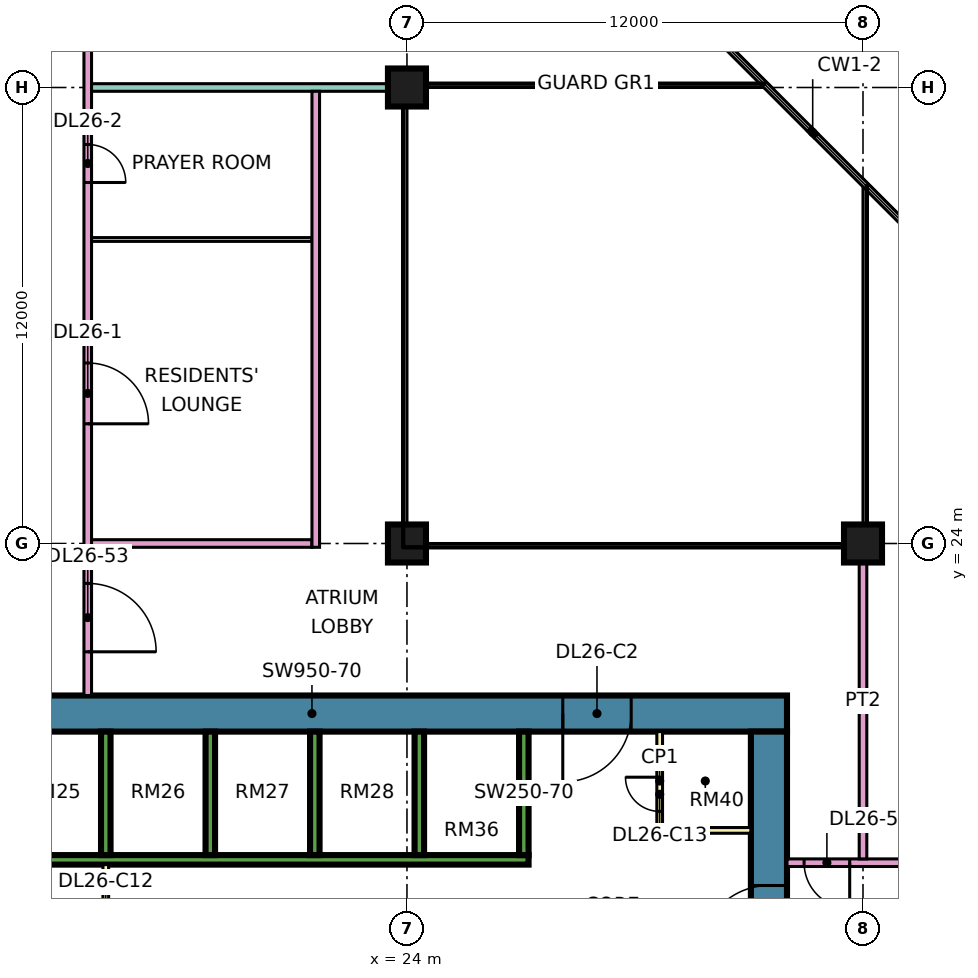
"""IFC4 building model, lengths in metres.
Left out: names, types, materials, properties, quantities, classifications, styles, units other than length and angle.
Written with IfcOpenShell. Run it as: python <this file> out.ifc"""

import sys

from ifc_helpers import new_model, si_unit, direction, frame, frame_2d, origin, origin_2d, place, context, subcontext, project, spatial, rectangle, extrude, element, fill, save


model = new_model("IFC4")
c1 = context("Model", 3, precision=1e-05, world=origin(), true_north=direction((0.0, 1.0)))
c2 = subcontext(c1, "Body", "Model", "MODEL_VIEW")
j1 = project(units=[si_unit("LENGTHUNIT", "METRE"), si_unit("PLANEANGLEUNIT", "RADIAN")], contexts=[c1])
p1 = place(None, origin())
s1 = spatial("IfcSite", under=j1, at=p1, CompositionType="ELEMENT")
p2 = place(p1, origin())
s2 = spatial("IfcBuilding", under=s1, at=p2, CompositionType="ELEMENT")
p3 = place(p2, frame((0.0, 0.0, 114.4)))
s3 = spatial("IfcBuildingStorey", under=s2, at=p3, CompositionType="ELEMENT", Elevation=114.4)
for number, where, z_axis, x_axis in (
    (1, (24.0, 24.0, 0.0), (0.0, 0.0, 1.0), (1.0, 0.0, 0.0)),
    (2, (24.0, 36.0, 0.0), (0.0, 0.0, 1.0), (1.0, 0.0, 0.0)),
    (3, (36.0, 24.0, 0.0), (0.0, 0.0, 1.0), (1.0, 0.0, 0.0)),
):
    element("IfcColumn", number, at=place(p3, frame(where, z_axis=z_axis, x_axis=x_axis)), inside=s3, PredefinedType="COLUMN", context=c2, shape_type="SweptSolid", body=[
        extrude(rectangle(XDim=1.0, YDim=1.0, at=origin_2d()), origin(), (0.0, 0.0, 1.0), 3.75),
    ])
p4 = place(p3, frame((9.0, 19.525, 0.0), z_axis=(0.0, 0.0, 1.0), x_axis=(1.0, 0.0, 0.0)))
e4 = element("IfcWall", 4, at=p4, inside=s3, PredefinedType="SHEAR", context=c2, shape_type="SweptSolid", body=[
    extrude(rectangle(XDim=25.0, YDim=0.95, at=frame_2d((12.5, 0.0))), origin(), (0.0, 0.0, 1.0), 3.75),
])
p5 = place(p4, frame((19.1, 0.0, 0.0)))
e5 = element("IfcOpeningElement", 5, at=p5, cuts=e4, PredefinedType="OPENING", context=c2, shape_type="SweptSolid", body=[
    extrude(rectangle(XDim=1.8, YDim=2.4, at=frame_2d((0.9, 1.2))), frame((0.0, 0.485, 0.0), z_axis=(0.0, -1.0, 0.0), x_axis=(1.0, 0.0, 0.0)), (0.0, 0.0, 1.0), 0.97),
])
p6 = place(p3, frame((33.525, 7.95, 0.0), z_axis=(0.0, 0.0, 1.0), x_axis=(0.0, 1.0, 0.0)))
e6 = element("IfcWall", 6, at=p6, inside=s3, PredefinedType="SHEAR", context=c2, shape_type="SweptSolid", body=[
    extrude(rectangle(XDim=11.1, YDim=0.95, at=frame_2d((5.55, 0.0))), origin(), (0.0, 0.0, 1.0), 3.75),
])
p7 = place(p6, frame((5.25, 0.0, 0.0)))
e7 = element("IfcOpeningElement", 7, at=p7, cuts=e6, PredefinedType="OPENING", context=c2, shape_type="SweptSolid", body=[
    extrude(rectangle(XDim=1.8, YDim=2.4, at=frame_2d((0.9, 1.2))), frame((0.0, 0.485, 0.0), z_axis=(0.0, -1.0, 0.0), x_axis=(1.0, 0.0, 0.0)), (0.0, 0.0, 1.0), 0.97),
])
p8 = place(p3, frame((13.45, 15.675, 0.0), z_axis=(0.0, 0.0, 1.0), x_axis=(1.0, 0.0, 0.0)))
e8 = element("IfcWall", 8, at=p8, inside=s3, PredefinedType="SHEAR", context=c2, shape_type="SweptSolid", body=[
    extrude(rectangle(XDim=13.75, YDim=0.25, at=frame_2d((6.875, 0.0))), origin(), (0.0, 0.0, 1.0), 3.75),
])
for number, where, z_axis, x_axis in (
    (9, (16.075, 15.8, 0.0), (0.0, 0.0, 1.0), (0.0, 1.0, 0.0)),
    (10, (18.825, 15.8, 0.0), (0.0, 0.0, 1.0), (0.0, 1.0, 0.0)),
    (11, (21.575, 15.8, 0.0), (0.0, 0.0, 1.0), (0.0, 1.0, 0.0)),
    (12, (24.325, 15.8, 0.0), (0.0, 0.0, 1.0), (0.0, 1.0, 0.0)),
    (13, (27.075, 15.8, 0.0), (0.0, 0.0, 1.0), (0.0, 1.0, 0.0)),
):
    element("IfcWall", number, at=place(p3, frame(where, z_axis=z_axis, x_axis=x_axis)), inside=s3, PredefinedType="SHEAR", context=c2, shape_type="SweptSolid", body=[
        extrude(rectangle(XDim=3.25, YDim=0.25, at=frame_2d((1.625, 0.0))), origin(), (0.0, 0.0, 1.0), 3.75),
    ])
p9 = place(p3, frame((16.075, 11.45, 0.0), z_axis=(0.0, 0.0, 1.0), x_axis=(0.0, 1.0, 0.0)))
e14 = element("IfcWall", 14, at=p9, inside=s3, PredefinedType="PARTITIONING", context=c2, shape_type="SweptSolid", body=[
    extrude(rectangle(XDim=4.1, YDim=0.15, at=frame_2d((2.05, 0.0))), origin(), (0.0, 0.0, 1.0), 3.35),
])
p10 = place(p9, frame((1.15, 0.0, 0.0)))
e15 = element("IfcOpeningElement", 15, at=p10, cuts=e14, PredefinedType="OPENING", context=c2, shape_type="SweptSolid", body=[
    extrude(rectangle(XDim=1.8, YDim=2.4, at=frame_2d((0.9, 1.2))), frame((0.0, 0.085, 0.0), z_axis=(0.0, -1.0, 0.0), x_axis=(1.0, 0.0, 0.0)), (0.0, 0.0, 1.0), 0.17),
])
p11 = place(p3, frame((30.65, 16.45, 0.0), z_axis=(0.0, 0.0, 1.0), x_axis=(0.0, 1.0, 0.0)))
e16 = element("IfcWall", 16, at=p11, inside=s3, PredefinedType="PARTITIONING", context=c2, shape_type="SweptSolid", body=[
    extrude(rectangle(XDim=2.6, YDim=0.15, at=frame_2d((1.3, 0.0))), origin(), (0.0, 0.0, 1.0), 3.35),
])
p12 = place(p11, frame((0.5, 0.0, 0.0)))
e17 = element("IfcOpeningElement", 17, at=p12, cuts=e16, PredefinedType="OPENING", context=c2, shape_type="SweptSolid", body=[
    extrude(rectangle(XDim=0.9, YDim=2.1, at=frame_2d((0.45, 1.05))), frame((0.0, 0.085, 0.0), z_axis=(0.0, -1.0, 0.0), x_axis=(1.0, 0.0, 0.0)), (0.0, 0.0, 1.0), 0.17),
])
p13 = place(p3, frame((30.65, 16.45, 0.0), z_axis=(0.0, 0.0, 1.0), x_axis=(1.0, 0.0, 0.0)))
e18 = element("IfcWall", 18, at=p13, inside=s3, PredefinedType="PARTITIONING", context=c2, shape_type="SweptSolid", body=[
    extrude(rectangle(XDim=2.4, YDim=0.15, at=frame_2d((1.2, 0.0))), origin(), (0.0, 0.0, 1.0), 3.35),
])
p14 = place(p3, frame((15.6, 20.0, 0.0), z_axis=(0.0, 0.0, 1.0), x_axis=(0.0, 1.0, 0.0)))
e19 = element("IfcWall", 19, at=p14, inside=s3, PredefinedType="PARTITIONING", context=c2, shape_type="SweptSolid", body=[
    extrude(rectangle(XDim=27.775, YDim=0.2, at=frame_2d((13.887, 0.0))), origin(), (0.0, 0.0, 1.0), 3.35),
])
p15 = place(p14, frame((7.15, 0.0, 0.0)))
e20 = element("IfcOpeningElement", 20, at=p15, cuts=e19, PredefinedType="OPENING", context=c2, shape_type="SweptSolid", body=[
    extrude(rectangle(XDim=1.6, YDim=2.1, at=frame_2d((0.8, 1.05))), frame((0.0, 0.11, 0.0), z_axis=(0.0, -1.0, 0.0), x_axis=(1.0, 0.0, 0.0)), (0.0, 0.0, 1.0), 0.22),
])
p16 = place(p14, frame((13.5, 0.0, 0.0)))
e21 = element("IfcOpeningElement", 21, at=p16, cuts=e19, PredefinedType="OPENING", context=c2, shape_type="SweptSolid", body=[
    extrude(rectangle(XDim=1.0, YDim=2.1, at=frame_2d((0.5, 1.05))), frame((0.0, 0.11, 0.0), z_axis=(0.0, -1.0, 0.0), x_axis=(1.0, 0.0, 0.0)), (0.0, 0.0, 1.0), 0.22),
])
p17 = place(p14, frame((17.2, 0.0, 0.0)))
e22 = element("IfcOpeningElement", 22, at=p17, cuts=e19, PredefinedType="OPENING", context=c2, shape_type="SweptSolid", body=[
    extrude(rectangle(XDim=1.0, YDim=2.1, at=frame_2d((0.5, 1.05))), frame((0.0, 0.11, 0.0), z_axis=(0.0, -1.0, 0.0), x_axis=(1.0, 0.0, 0.0)), (0.0, 0.0, 1.0), 0.22),
])
p18 = place(p14, frame((1.15, 0.0, 0.0)))
e23 = element("IfcOpeningElement", 23, at=p18, cuts=e19, PredefinedType="OPENING", context=c2, shape_type="SweptSolid", body=[
    extrude(rectangle(XDim=1.8, YDim=2.1, at=frame_2d((0.9, 1.05))), frame((0.0, 0.11, 0.0), z_axis=(0.0, -1.0, 0.0), x_axis=(1.0, 0.0, 0.0)), (0.0, 0.0, 1.0), 0.22),
])
p19 = place(p14, frame((25.9, 0.0, 0.0)))
e24 = element("IfcOpeningElement", 24, at=p19, cuts=e19, PredefinedType="OPENING", context=c2, shape_type="SweptSolid", body=[
    extrude(rectangle(XDim=1.0, YDim=2.1, at=frame_2d((0.5, 1.05))), frame((0.0, 0.11, 0.0), z_axis=(0.0, -1.0, 0.0), x_axis=(1.0, 0.0, 0.0)), (0.0, 0.0, 1.0), 0.22),
])
p20 = place(p3, frame((15.7, 24.0, 0.0), z_axis=(0.0, 0.0, 1.0), x_axis=(1.0, 0.0, 0.0)))
e25 = element("IfcWall", 25, at=p20, inside=s3, PredefinedType="PARTITIONING", context=c2, shape_type="SweptSolid", body=[
    extrude(rectangle(XDim=5.8, YDim=0.2, at=frame_2d((2.9, 0.0))), origin(), (0.0, 0.0, 1.0), 3.35),
])
p21 = place(p3, frame((15.7, 32.0, 0.0), z_axis=(0.0, 0.0, 1.0), x_axis=(1.0, 0.0, 0.0)))
e26 = element("IfcWall", 26, at=p21, inside=s3, PredefinedType="PARTITIONING", context=c2, shape_type="SweptSolid", body=[
    extrude(rectangle(XDim=5.8, YDim=0.1, at=frame_2d((2.9, 0.0))), origin(), (0.0, 0.0, 1.0), 3.35),
])
p22 = place(p3, frame((15.7, 36.0, 0.0), z_axis=(0.0, 0.0, 1.0), x_axis=(1.0, 0.0, 0.0)))
e27 = element("IfcWall", 27, at=p22, inside=s3, PredefinedType="PARTITIONING", context=c2, shape_type="SweptSolid", body=[
    extrude(rectangle(XDim=8.3, YDim=0.2, at=frame_2d((4.15, 0.0))), origin(), (0.0, 0.0, 1.0), 3.35),
])
p23 = place(p3, frame((21.6, 23.9, 0.0), z_axis=(0.0, 0.0, 1.0), x_axis=(0.0, 1.0, 0.0)))
e28 = element("IfcWall", 28, at=p23, inside=s3, PredefinedType="PARTITIONING", context=c2, shape_type="SweptSolid", body=[
    extrude(rectangle(XDim=12.0, YDim=0.2, at=frame_2d((6.0, 0.0))), origin(), (0.0, 0.0, 1.0), 3.35),
])
p24 = place(p3, frame((34.0, 15.6, 0.0), z_axis=(0.0, 0.0, 1.0), x_axis=(1.0, 0.0, 0.0)))
e29 = element("IfcWall", 29, at=p24, inside=s3, PredefinedType="PARTITIONING", context=c2, shape_type="SweptSolid", body=[
    extrude(rectangle(XDim=10.35, YDim=0.2, at=frame_2d((5.175, 0.0))), origin(), (0.0, 0.0, 1.0), 3.35),
])
p25 = place(p24, frame((5.6, 0.0, 0.0)))
e30 = element("IfcOpeningElement", 30, at=p25, cuts=e29, PredefinedType="OPENING", context=c2, shape_type="SweptSolid", body=[
    extrude(rectangle(XDim=1.0, YDim=2.1, at=frame_2d((0.5, 1.05))), frame((0.0, 0.11, 0.0), z_axis=(0.0, -1.0, 0.0), x_axis=(1.0, 0.0, 0.0)), (0.0, 0.0, 1.0), 0.22),
])
p26 = place(p24, frame((0.45, 0.0, 0.0)))
e31 = element("IfcOpeningElement", 31, at=p26, cuts=e29, PredefinedType="OPENING", context=c2, shape_type="SweptSolid", body=[
    extrude(rectangle(XDim=1.2, YDim=2.1, at=frame_2d((0.6, 1.05))), frame((0.0, 0.11, 0.0), z_axis=(0.0, -1.0, 0.0), x_axis=(1.0, 0.0, 0.0)), (0.0, 0.0, 1.0), 0.22),
])
p27 = place(p3, frame((36.0, 15.7, 0.0), z_axis=(0.0, 0.0, 1.0), x_axis=(0.0, 1.0, 0.0)))
e32 = element("IfcWall", 32, at=p27, inside=s3, PredefinedType="PARTITIONING", context=c2, shape_type="SweptSolid", body=[
    extrude(rectangle(XDim=8.3, YDim=0.2, at=frame_2d((4.15, 0.0))), origin(), (0.0, 0.0, 1.0), 3.35),
])
p28 = place(p7, origin())
e33 = element("IfcDoor", 33, at=p28, inside=s3, OperationType="DOUBLE_DOOR_SINGLE_SWING", PredefinedType="DOOR", context=c2, shape_type="SweptSolid", body=[
    extrude(rectangle(XDim=1.8, YDim=2.4, at=frame_2d((0.9, 1.2))), frame((0.0, 0.025, 0.0), z_axis=(0.0, -1.0, 0.0), x_axis=(1.0, 0.0, 0.0)), (0.0, 0.0, 1.0), 0.05),
])
fill(e7, e33)
p29 = place(p5, frame((1.8, 0.0, 0.0), z_axis=(0.0, 0.0, 1.0), x_axis=(-1.0, 0.0, 0.0)))
e34 = element("IfcDoor", 34, at=p29, inside=s3, OperationType="DOUBLE_DOOR_SINGLE_SWING", PredefinedType="DOOR", context=c2, shape_type="SweptSolid", body=[
    extrude(rectangle(XDim=1.8, YDim=2.4, at=frame_2d((0.9, 1.2))), frame((0.0, 0.025, 0.0), z_axis=(0.0, -1.0, 0.0), x_axis=(1.0, 0.0, 0.0)), (0.0, 0.0, 1.0), 0.05),
])
fill(e5, e34)
p30 = place(p12, frame((0.9, 0.0, 0.0), z_axis=(0.0, 0.0, 1.0), x_axis=(-1.0, 0.0, 0.0)))
e35 = element("IfcDoor", 35, at=p30, inside=s3, OperationType="SINGLE_SWING_RIGHT", PredefinedType="DOOR", context=c2, shape_type="SweptSolid", body=[
    extrude(rectangle(XDim=0.9, YDim=2.1, at=frame_2d((0.45, 1.05))), frame((0.0, 0.025, 0.0), z_axis=(0.0, -1.0, 0.0), x_axis=(1.0, 0.0, 0.0)), (0.0, 0.0, 1.0), 0.05),
])
fill(e17, e35)
p31 = place(p15, frame((1.6, 0.0, 0.0), z_axis=(0.0, 0.0, 1.0), x_axis=(-1.0, 0.0, 0.0)))
e36 = element("IfcDoor", 36, at=p31, inside=s3, OperationType="DOUBLE_DOOR_SINGLE_SWING", PredefinedType="DOOR", context=c2, shape_type="SweptSolid", body=[
    extrude(rectangle(XDim=1.6, YDim=2.1, at=frame_2d((0.8, 1.05))), frame((0.0, 0.025, 0.0), z_axis=(0.0, -1.0, 0.0), x_axis=(1.0, 0.0, 0.0)), (0.0, 0.0, 1.0), 0.05),
])
fill(e20, e36)
p32 = place(p16, frame((1.0, 0.0, 0.0), z_axis=(0.0, 0.0, 1.0), x_axis=(-1.0, 0.0, 0.0)))
e37 = element("IfcDoor", 37, at=p32, inside=s3, OperationType="SINGLE_SWING_LEFT", PredefinedType="DOOR", context=c2, shape_type="SweptSolid", body=[
    extrude(rectangle(XDim=1.0, YDim=2.1, at=frame_2d((0.5, 1.05))), frame((0.0, 0.025, 0.0), z_axis=(0.0, -1.0, 0.0), x_axis=(1.0, 0.0, 0.0)), (0.0, 0.0, 1.0), 0.05),
])
fill(e21, e37)
p33 = place(p26, origin())
e38 = element("IfcDoor", 38, at=p33, inside=s3, OperationType="SINGLE_SWING_RIGHT", PredefinedType="DOOR", context=c2, shape_type="SweptSolid", body=[
    extrude(rectangle(XDim=1.2, YDim=2.1, at=frame_2d((0.6, 1.05))), frame((0.0, 0.025, 0.0), z_axis=(0.0, -1.0, 0.0), x_axis=(1.0, 0.0, 0.0)), (0.0, 0.0, 1.0), 0.05),
])
fill(e31, e38)
p34 = place(p18, frame((1.8, 0.0, 0.0), z_axis=(0.0, 0.0, 1.0), x_axis=(-1.0, 0.0, 0.0)))
e39 = element("IfcDoor", 39, at=p34, inside=s3, OperationType="DOUBLE_DOOR_SINGLE_SWING", PredefinedType="DOOR", context=c2, shape_type="SweptSolid", body=[
    extrude(rectangle(XDim=1.8, YDim=2.1, at=frame_2d((0.9, 1.05))), frame((0.0, 0.025, 0.0), z_axis=(0.0, -1.0, 0.0), x_axis=(1.0, 0.0, 0.0)), (0.0, 0.0, 1.0), 0.05),
])
fill(e23, e39)
save(model, sys.argv[1])
